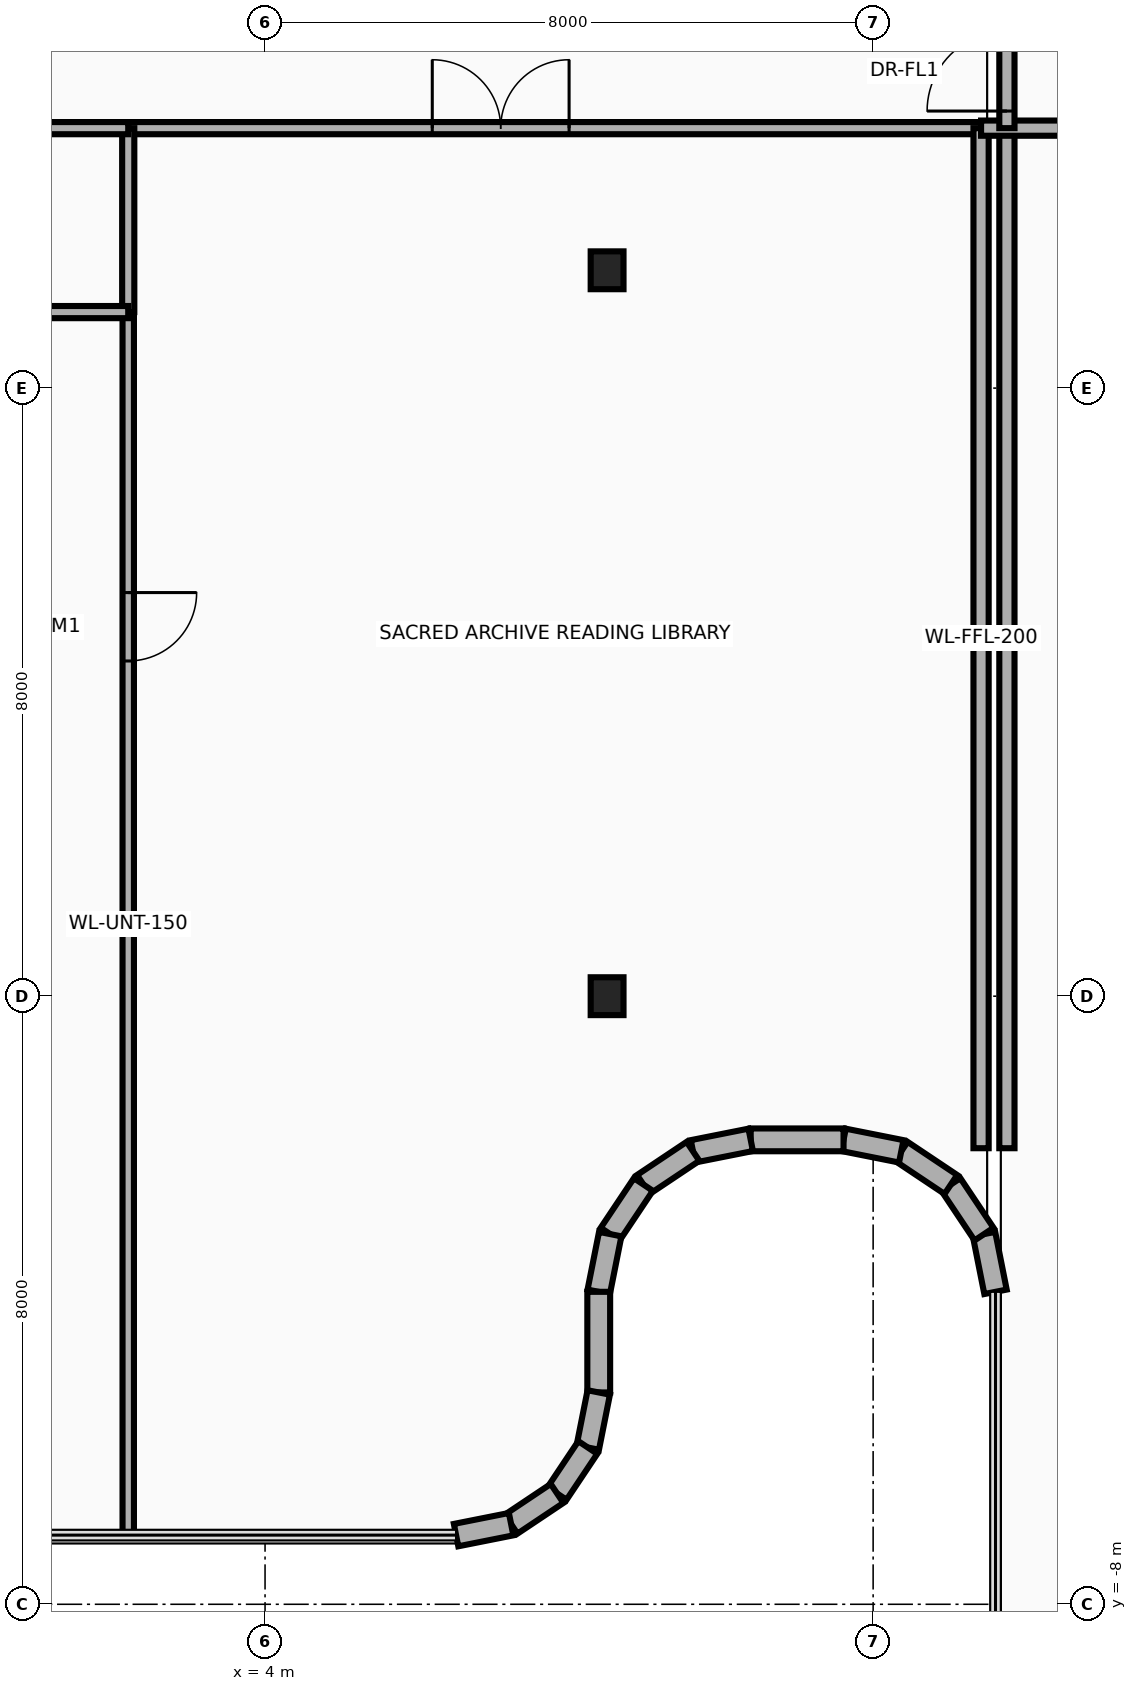
"""IFC4 building model, lengths in metres.
Left out: names, types, materials, properties, quantities, classifications, styles, units other than length and angle.
Written with IfcOpenShell. Run it as: python <this file> out.ifc"""

import sys

from ifc_helpers import new_model, si_unit, direction, frame, frame_2d, origin, origin_2d, place, context, subcontext, project, spatial, rectangle, i_section, extrude, source, transform, mapped, element, fill, save


model = new_model("IFC4")
c1 = context("Model", 3, precision=1e-05, world=origin(), true_north=direction((0.0, 1.0)))
c2 = subcontext(c1, "Body", "Model", "MODEL_VIEW")
j1 = project(units=[si_unit("LENGTHUNIT", "METRE"), si_unit("PLANEANGLEUNIT", "RADIAN")], contexts=[c1])
p1 = place(None, origin())
s1 = spatial("IfcSite", under=j1, at=p1, CompositionType="ELEMENT")
p2 = place(p1, origin())
s2 = spatial("IfcBuilding", under=s1, at=p2, CompositionType="ELEMENT")
p3 = place(p2, frame((0.0, 0.0, 188.4)))
s3 = spatial("IfcBuildingStorey", under=s2, at=p3, CompositionType="ELEMENT", Elevation=188.4)
m1 = source(origin(), c2, "Body", "SweptSolid", [
    extrude(i_section(OverallWidth=0.432, OverallDepth=0.498, WebThickness=0.056, FlangeThickness=0.089, at=origin_2d()), origin(), (0.0, 0.0, 1.0), 3.95),
])
for number, where, z_axis, x_axis in (
    (1, (8.5, 0.0, 0.0), (0.0, 0.0, 1.0), (1.0, 0.0, 0.0)),
    (2, (8.5, 9.55, 0.0), (0.0, 0.0, 1.0), (1.0, 0.0, 0.0)),
):
    element("IfcColumn", number, at=place(p3, frame(where, z_axis=z_axis, x_axis=x_axis)), inside=s3, PredefinedType="COLUMN", context=c2, shape_type="MappedRepresentation", body=[
        mapped(m1, transform((0.0, 0.0, 0.0), x_axis=(1.0, 0.0, 0.0), y_axis=(0.0, 1.0, 0.0), z_axis=(0.0, 0.0, 1.0), scale=1.0)),
    ])
p4 = place(p3, frame((13.61, -3.889, 0.0), z_axis=(0.0, 0.0, 1.0), x_axis=(-0.195206365311, 0.98076219082, 0.0)))
e3 = element("IfcWall", 3, at=p4, inside=s3, PredefinedType="SOLIDWALL", context=c2, shape_type="SweptSolid", body=[
    extrude(rectangle(XDim=0.774, YDim=0.3, at=frame_2d((0.387, 0.0))), origin(), (0.0, 0.0, 1.0), 3.63),
])
for number, where, z_axis, x_axis in (
    (4, (13.459, -3.13, 0.0), (0.0, 0.0, 1.0), (-0.556, 0.831, 0.0)),
    (5, (13.023, -2.477, 0.0), (0.0, 0.0, 1.0), (-0.831, 0.556, 0.0)),
):
    element("IfcWall", number, at=place(p3, frame(where, z_axis=z_axis, x_axis=x_axis)), inside=s3, PredefinedType="SOLIDWALL", context=c2, shape_type="SweptSolid", body=[
        extrude(rectangle(XDim=0.785, YDim=0.3, at=frame_2d((0.393, 0.0))), origin(), (0.0, 0.0, 1.0), 3.63),
    ])
p5 = place(p3, frame((12.37, -2.041, 0.0), z_axis=(0.0, 0.0, 1.0), x_axis=(-0.98076219082, 0.195206365311, 0.0)))
e6 = element("IfcWall", 6, at=p5, inside=s3, PredefinedType="SOLIDWALL", context=c2, shape_type="SweptSolid", body=[
    extrude(rectangle(XDim=0.774, YDim=0.3, at=frame_2d((0.387, 0.0))), origin(), (0.0, 0.0, 1.0), 3.63),
])
p6 = place(p3, frame((11.611, -1.89, 0.0), z_axis=(0.0, 0.0, 1.0), x_axis=(-1.0, 0.0, 0.0)))
e7 = element("IfcWall", 7, at=p6, inside=s3, PredefinedType="SOLIDWALL", context=c2, shape_type="SweptSolid", body=[
    extrude(rectangle(XDim=1.222, YDim=0.3, at=frame_2d((0.611, 0.0))), origin(), (0.0, 0.0, 1.0), 3.63),
])
p7 = place(p3, frame((10.389, -1.89, 0.0), z_axis=(0.0, 0.0, 1.0), x_axis=(-0.98076219082, -0.195206365311, 0.0)))
e8 = element("IfcWall", 8, at=p7, inside=s3, PredefinedType="SOLIDWALL", context=c2, shape_type="SweptSolid", body=[
    extrude(rectangle(XDim=0.774, YDim=0.3, at=frame_2d((0.387, 0.0))), origin(), (0.0, 0.0, 1.0), 3.63),
])
for number, where, z_axis, x_axis in (
    (9, (9.63, -2.041, 0.0), (0.0, 0.0, 1.0), (-0.831, -0.556, 0.0)),
    (10, (8.977, -2.477, 0.0), (0.0, 0.0, 1.0), (-0.556, -0.831, 0.0)),
):
    element("IfcWall", number, at=place(p3, frame(where, z_axis=z_axis, x_axis=x_axis)), inside=s3, PredefinedType="SOLIDWALL", context=c2, shape_type="SweptSolid", body=[
        extrude(rectangle(XDim=0.785, YDim=0.3, at=frame_2d((0.393, 0.0))), origin(), (0.0, 0.0, 1.0), 2.615),
    ])
p8 = place(p3, frame((8.541, -3.13, 0.0), z_axis=(0.0, 0.0, 1.0), x_axis=(-0.195206365311, -0.98076219082, 0.0)))
e11 = element("IfcWall", 11, at=p8, inside=s3, PredefinedType="SOLIDWALL", context=c2, shape_type="SweptSolid", body=[
    extrude(rectangle(XDim=0.774, YDim=0.3, at=frame_2d((0.387, 0.0))), origin(), (0.0, 0.0, 1.0), 2.615),
])
p9 = place(p3, frame((8.39, -3.889, 0.0), z_axis=(0.0, 0.0, 1.0), x_axis=(0.0, -1.0, 0.0)))
e12 = element("IfcWall", 12, at=p9, inside=s3, PredefinedType="SOLIDWALL", context=c2, shape_type="SweptSolid", body=[
    extrude(rectangle(XDim=1.324, YDim=0.3, at=frame_2d((0.662, 0.0))), origin(), (0.0, 0.0, 1.0), 2.615),
])
p10 = place(p3, frame((8.39, -5.213, 0.0), z_axis=(0.0, 0.0, 1.0), x_axis=(-0.194780446724, -0.980846867546, 0.0)))
e13 = element("IfcWall", 13, at=p10, inside=s3, PredefinedType="SOLIDWALL", context=c2, shape_type="SweptSolid", body=[
    extrude(rectangle(XDim=0.738, YDim=0.3, at=frame_2d((0.369, 0.0))), origin(), (0.0, 0.0, 1.0), 2.615),
])
p11 = place(p3, frame((8.246, -5.937, 0.0), z_axis=(0.0, 0.0, 1.0), x_axis=(-0.555784030735, -0.83132671747, 0.0)))
e14 = element("IfcWall", 14, at=p11, inside=s3, PredefinedType="SOLIDWALL", context=c2, shape_type="SweptSolid", body=[
    extrude(rectangle(XDim=0.728, YDim=0.3, at=frame_2d((0.364, 0.0))), origin(), (0.0, 0.0, 1.0), 2.615),
])
p12 = place(p3, frame((7.842, -6.542, 0.0), z_axis=(0.0, 0.0, 1.0), x_axis=(-0.831378135196, -0.555707113792, 0.0)))
e15 = element("IfcWall", 15, at=p12, inside=s3, PredefinedType="SOLIDWALL", context=c2, shape_type="SweptSolid", body=[
    extrude(rectangle(XDim=0.727, YDim=0.3, at=frame_2d((0.364, 0.0))), origin(), (0.0, 0.0, 1.0), 3.63),
])
p13 = place(p3, frame((7.237, -6.946, 0.0), z_axis=(0.0, 0.0, 1.0), x_axis=(-0.980783640462, -0.195098566376, 0.0)))
e16 = element("IfcWall", 16, at=p13, inside=s3, PredefinedType="SOLIDWALL", context=c2, shape_type="SweptSolid", body=[
    extrude(rectangle(XDim=0.738, YDim=0.3, at=frame_2d((0.369, 0.0))), origin(), (0.0, 0.0, 1.0), 3.076),
])
p14 = place(p3, frame((2.2, 11.42, 0.0), z_axis=(0.0, 0.0, 1.0), x_axis=(1.0, 0.0, 0.0)))
e17 = element("IfcWall", 17, at=p14, inside=s3, PredefinedType="PARTITIONING", context=c2, shape_type="SweptSolid", body=[
    extrude(rectangle(XDim=11.22, YDim=0.16, at=frame_2d((5.61, 0.0))), origin(), (0.0, 0.0, 1.0), 2.615),
])
p15 = place(p14, frame((4.0, 0.0, 0.0)))
e18 = element("IfcOpeningElement", 18, at=p15, cuts=e17, PredefinedType="OPENING", context=c2, shape_type="SweptSolid", body=[
    extrude(rectangle(XDim=1.8, YDim=2.15, at=frame_2d((0.9, 1.075))), frame((0.0, 0.095, 0.0), z_axis=(0.0, -1.0, 0.0), x_axis=(1.0, 0.0, 0.0)), (0.0, 0.0, 1.0), 0.19),
])
for number, where, z_axis, x_axis in (
    (19, (13.42, -2.0, 0.0), (0.0, 0.0, 1.0), (0.0, 1.0, 0.0)),
    (20, (13.76, -2.0, 0.0), (0.0, 0.0, 1.0), (0.0, 1.0, 0.0)),
):
    element("IfcWall", number, at=place(p3, frame(where, z_axis=z_axis, x_axis=x_axis)), inside=s3, PredefinedType="PARTITIONING", context=c2, shape_type="SweptSolid", body=[
        extrude(rectangle(XDim=13.42, YDim=0.2, at=frame_2d((6.71, 0.0))), origin(), (0.0, 0.0, 1.0), 2.665),
    ])
p16 = place(p3, frame((2.2, -7.09, 0.0), z_axis=(0.0, 0.0, 1.0), x_axis=(0.0, 1.0, 0.0)))
e21 = element("IfcWall", 21, at=p16, inside=s3, PredefinedType="PARTITIONING", context=c2, shape_type="SweptSolid", body=[
    extrude(rectangle(XDim=16.09, YDim=0.15, at=frame_2d((8.045, 0.0))), origin(), (0.0, 0.0, 1.0), 2.665),
])
p17 = place(p16, frame((11.5, 0.0, 0.0)))
e22 = element("IfcOpeningElement", 22, at=p17, cuts=e21, PredefinedType="OPENING", context=c2, shape_type="SweptSolid", body=[
    extrude(rectangle(XDim=0.9, YDim=2.1, at=frame_2d((0.45, 1.05))), frame((0.0, 0.09, 0.0), z_axis=(0.0, -1.0, 0.0), x_axis=(1.0, 0.0, 0.0)), (0.0, 0.0, 1.0), 0.18),
])
p18 = place(p3, frame((2.2, 9.0, 0.0), z_axis=(0.0, 0.0, 1.0), x_axis=(0.0, 1.0, 0.0)))
e23 = element("IfcWall", 23, at=p18, inside=s3, PredefinedType="PARTITIONING", context=c2, shape_type="SweptSolid", body=[
    extrude(rectangle(XDim=2.42, YDim=0.16, at=frame_2d((1.21, 0.0))), origin(), (0.0, 0.0, 1.0), 2.665),
])
p19 = place(p3, frame((-2.2, 9.0, 0.0), z_axis=(0.0, 0.0, 1.0), x_axis=(1.0, 0.0, 0.0)))
e24 = element("IfcWall", 24, at=p19, inside=s3, PredefinedType="PARTITIONING", context=c2, shape_type="SweptSolid", body=[
    extrude(rectangle(XDim=4.4, YDim=0.16, at=frame_2d((2.2, 0.0))), origin(), (0.0, 0.0, 1.0), 3.63),
])
p20 = place(p3, frame((-2.2, 11.42, 0.0), z_axis=(0.0, 0.0, 1.0), x_axis=(1.0, 0.0, 0.0)))
e25 = element("IfcWall", 25, at=p20, inside=s3, PredefinedType="PARTITIONING", context=c2, shape_type="SweptSolid", body=[
    extrude(rectangle(XDim=4.4, YDim=0.16, at=frame_2d((2.2, 0.0))), origin(), (0.0, 0.0, 1.0), 3.63),
])
p21 = place(p20, frame((0.3, 0.0, 0.0)))
e26 = element("IfcOpeningElement", 26, at=p21, cuts=e25, PredefinedType="OPENING", context=c2, shape_type="SweptSolid", body=[
    extrude(rectangle(XDim=0.85, YDim=2.1, at=frame_2d((0.425, 1.05))), frame((0.0, 0.095, 0.0), z_axis=(0.0, -1.0, 0.0), x_axis=(1.0, 0.0, 0.0)), (0.0, 0.0, 1.0), 0.19),
])
p22 = place(p20, frame((2.45, 0.0, 0.0)))
e27 = element("IfcOpeningElement", 27, at=p22, cuts=e25, PredefinedType="OPENING", context=c2, shape_type="SweptSolid", body=[
    extrude(rectangle(XDim=0.85, YDim=2.1, at=frame_2d((0.425, 1.05))), frame((0.0, 0.095, 0.0), z_axis=(0.0, -1.0, 0.0), x_axis=(1.0, 0.0, 0.0)), (0.0, 0.0, 1.0), 0.19),
])
p23 = place(p3, frame((13.42, 11.42, 0.0), z_axis=(0.0, 0.0, 1.0), x_axis=(1.0, 0.0, 0.0)))
e28 = element("IfcWall", 28, at=p23, inside=s3, PredefinedType="PARTITIONING", context=c2, shape_type="SweptSolid", body=[
    extrude(rectangle(XDim=1.98, YDim=0.2, at=frame_2d((0.99, 0.0))), origin(), (0.0, 0.0, 1.0), 3.004),
])
p24 = place(p3, frame((13.76, 11.42, 0.0), z_axis=(0.0, 0.0, 1.0), x_axis=(0.0, 1.0, 0.0)))
e29 = element("IfcWall", 29, at=p24, inside=s3, PredefinedType="PARTITIONING", context=c2, shape_type="SweptSolid", body=[
    extrude(rectangle(XDim=1.5, YDim=0.2, at=frame_2d((0.75, 0.0))), origin(), (0.0, 0.0, 1.0), 3.004),
])
p25 = place(p24, frame((0.225, 0.0, 0.0)))
e30 = element("IfcOpeningElement", 30, at=p25, cuts=e29, PredefinedType="OPENING", context=c2, shape_type="SweptSolid", body=[
    extrude(rectangle(XDim=1.05, YDim=2.15, at=frame_2d((0.525, 1.075))), frame((0.0, 0.115, 0.0), z_axis=(0.0, -1.0, 0.0), x_axis=(1.0, 0.0, 0.0)), (0.0, 0.0, 1.0), 0.23),
])
p26 = place(p15, origin())
e31 = element("IfcDoor", 31, at=p26, inside=s3, OperationType="DOUBLE_DOOR_SINGLE_SWING", PredefinedType="DOOR", context=c2, shape_type="SweptSolid", body=[
    extrude(rectangle(XDim=1.8, YDim=2.15, at=frame_2d((0.9, 1.075))), frame((0.0, 0.025, 0.0), z_axis=(0.0, -1.0, 0.0), x_axis=(1.0, 0.0, 0.0)), (0.0, 0.0, 1.0), 0.05),
])
fill(e18, e31)
p27 = place(p17, frame((0.9, 0.0, 0.0), z_axis=(0.0, 0.0, 1.0), x_axis=(-1.0, 0.0, 0.0)))
e32 = element("IfcDoor", 32, at=p27, inside=s3, OperationType="SINGLE_SWING_LEFT", PredefinedType="DOOR", context=c2, shape_type="SweptSolid", body=[
    extrude(rectangle(XDim=0.9, YDim=2.1, at=frame_2d((0.45, 1.05))), frame((0.0, 0.025, 0.0), z_axis=(0.0, -1.0, 0.0), x_axis=(1.0, 0.0, 0.0)), (0.0, 0.0, 1.0), 0.05),
])
fill(e22, e32)
p28 = place(p25, origin())
e33 = element("IfcDoor", 33, at=p28, inside=s3, OperationType="SINGLE_SWING_LEFT", PredefinedType="DOOR", context=c2, shape_type="SweptSolid", body=[
    extrude(rectangle(XDim=1.05, YDim=2.15, at=frame_2d((0.525, 1.075))), frame((0.0, 0.025, 0.0), z_axis=(0.0, -1.0, 0.0), x_axis=(1.0, 0.0, 0.0)), (0.0, 0.0, 1.0), 0.05),
])
fill(e30, e33)
save(model, sys.argv[1])
